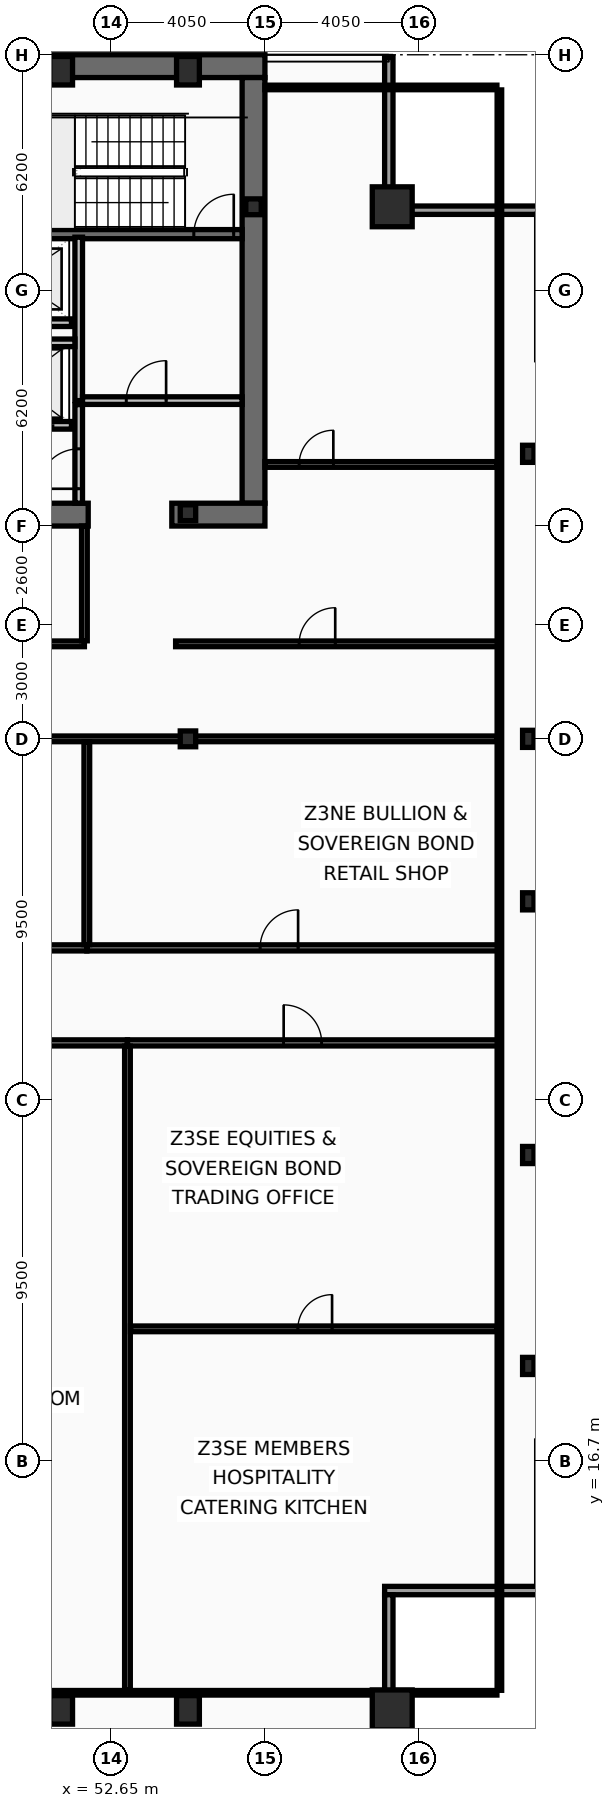
"""IFC4 building model, lengths in metres.
Left out: names, types, materials, properties, quantities, classifications, styles, units other than length and angle.
Written with IfcOpenShell. Run it as: python <this file> out.ifc"""

import sys

from ifc_helpers import new_model, si_unit, direction, frame, frame_2d, origin, origin_2d, place, context, subcontext, project, spatial, rectangle, hollow_rectangle, i_section, extrude, element, fill, save


model = new_model("IFC4")
c1 = context("Model", 3, precision=1e-05, world=origin(), true_north=direction((0.0, 1.0)))
c2 = subcontext(c1, "Body", "Model", "MODEL_VIEW")
j1 = project(units=[si_unit("LENGTHUNIT", "METRE"), si_unit("PLANEANGLEUNIT", "RADIAN")], contexts=[c1])
p1 = place(None, origin())
s1 = spatial("IfcSite", under=j1, at=p1, CompositionType="ELEMENT")
p2 = place(p1, origin())
s2 = spatial("IfcBuilding", under=s1, at=p2, CompositionType="ELEMENT")
p3 = place(p2, frame((0.0, 0.0, 246.2)))
s3 = spatial("IfcBuildingStorey", under=s2, at=p3, CompositionType="ELEMENT", Elevation=246.2)
p4 = place(p3, frame((16.2, 53.4, 0.0), z_axis=(0.0, 0.0, 1.0), x_axis=(1.0, 0.0, 0.0)))
e1 = element("IfcWall", 1, at=p4, inside=s3, PredefinedType="SHEAR", context=c2, shape_type="SweptSolid", body=[
    extrude(rectangle(XDim=40.5, YDim=0.6, at=frame_2d((20.25, 0.0))), origin(), (0.0, 0.0, 1.0), 3.44),
])
p5 = place(p3, frame((56.4, 53.1, 0.0), z_axis=(0.0, 0.0, 1.0), x_axis=(0.0, -1.0, 0.0)))
e2 = element("IfcWall", 2, at=p5, inside=s3, PredefinedType="SHEAR", context=c2, shape_type="SweptSolid", body=[
    extrude(rectangle(XDim=11.2, YDim=0.6, at=frame_2d((5.6, 0.0))), origin(), (0.0, 0.0, 1.0), 3.44),
])
p6 = place(p3, frame((52.05, 41.6, 0.0), z_axis=(0.0, 0.0, 1.0), x_axis=(-1.0, 0.0, 0.0)))
e3 = element("IfcWall", 3, at=p6, inside=s3, PredefinedType="SHEAR", context=c2, shape_type="SweptSolid", body=[
    extrude(rectangle(XDim=11.3, YDim=0.6, at=frame_2d((5.65, 0.0))), origin(), (0.0, 0.0, 1.0), 3.44),
])
p7 = place(p3, frame((56.7, 41.6, 0.0), z_axis=(0.0, 0.0, 1.0), x_axis=(-1.0, 0.0, 0.0)))
e4 = element("IfcWall", 4, at=p7, inside=s3, PredefinedType="SHEAR", context=c2, shape_type="SweptSolid", body=[
    extrude(rectangle(XDim=2.45, YDim=0.6, at=frame_2d((1.225, 0.0))), origin(), (0.0, 0.0, 1.0), 3.44),
])
p8 = place(p3, frame((48.63, 48.98, 0.0), z_axis=(0.0, 0.0, 1.0), x_axis=(1.0, 0.0, 0.0)))
e5 = element("IfcWall", 5, at=p8, inside=s3, PredefinedType="SHEAR", context=c2, shape_type="SweptSolid", body=[
    extrude(rectangle(XDim=7.47, YDim=0.24, at=frame_2d((3.735, 0.0))), origin(), (0.0, 0.0, 1.0), 3.44),
])
p9 = place(p8, frame((6.2, 0.0, 0.0)))
e6 = element("IfcOpeningElement", 6, at=p9, cuts=e5, PredefinedType="OPENING", context=c2, shape_type="SweptSolid", body=[
    extrude(rectangle(XDim=1.05, YDim=2.15, at=frame_2d((0.525, 1.075))), frame((0.0, 0.13, 0.0), z_axis=(0.0, -1.0, 0.0), x_axis=(1.0, 0.0, 0.0)), (0.0, 0.0, 1.0), 0.26),
])
for number, where, z_axis, x_axis in (
    (7, (60.05, 10.15, 0.0), (0.0, 0.0, 1.0), (1.0, 0.0, 0.0)),
    (8, (60.05, 49.7, 0.0), (0.0, 0.0, 1.0), (1.0, 0.0, 0.0)),
):
    element("IfcColumn", number, at=place(p3, frame(where, z_axis=z_axis, x_axis=x_axis)), inside=s3, PredefinedType="COLUMN", context=c2, shape_type="SweptSolid", body=[
        extrude(hollow_rectangle(XDim=1.05, YDim=1.05, WallThickness=0.055, at=origin_2d()), origin(), (0.0, 0.0, 1.0), 3.6),
    ])
for number, where, z_axis, x_axis in (
    (9, (51.337, 10.15, 0.0), (0.0, 0.0, 1.0), (1.0, 0.0, 0.0)),
    (10, (54.675, 10.15, 0.0), (0.0, 0.0, 1.0), (1.0, 0.0, 0.0)),
    (11, (51.337, 53.28, 0.0), (0.0, 0.0, 1.0), (1.0, 0.0, 0.0)),
    (12, (54.675, 53.28, 0.0), (0.0, 0.0, 1.0), (1.0, 0.0, 0.0)),
):
    element("IfcColumn", number, at=place(p3, frame(where, z_axis=z_axis, x_axis=x_axis)), inside=s3, PredefinedType="COLUMN", context=c2, shape_type="SweptSolid", body=[
        extrude(hollow_rectangle(XDim=0.6, YDim=0.75, WallThickness=0.045, at=origin_2d()), origin(), (0.0, 0.0, 1.0), 3.6),
    ])
for number, where, z_axis, x_axis in (
    (13, (63.63, 19.2, 0.0), (0.0, 0.0, 1.0), (1.0, 0.0, 0.0)),
    (14, (63.63, 24.75, 0.0), (0.0, 0.0, 1.0), (1.0, 0.0, 0.0)),
    (15, (63.63, 31.425, 0.0), (0.0, 0.0, 1.0), (1.0, 0.0, 0.0)),
    (16, (63.63, 35.7, 0.0), (0.0, 0.0, 1.0), (1.0, 0.0, 0.0)),
    (17, (63.63, 43.2, 0.0), (0.0, 0.0, 1.0), (1.0, 0.0, 0.0)),
):
    element("IfcColumn", number, at=place(p3, frame(where, z_axis=z_axis, x_axis=x_axis)), inside=s3, PredefinedType="COLUMN", context=c2, shape_type="SweptSolid", body=[
        extrude(i_section(OverallWidth=0.3, OverallDepth=0.45, WebThickness=0.014, FlangeThickness=0.026, at=origin_2d()), origin(), (0.0, 0.0, 1.0), 3.6),
    ])
for number, where, z_axis, x_axis in (
    (18, (56.4, 49.7, 0.0), (0.0, 0.0, 1.0), (1.0, 0.0, 0.0)),
    (19, (54.675, 35.7, 0.0), (0.0, 0.0, 1.0), (1.0, 0.0, 0.0)),
    (20, (54.675, 41.65, 0.0), (0.0, 0.0, 1.0), (1.0, 0.0, 0.0)),
):
    element("IfcColumn", number, at=place(p3, frame(where, z_axis=z_axis, x_axis=x_axis)), inside=s3, PredefinedType="COLUMN", context=c2, shape_type="SweptSolid", body=[
        extrude(i_section(OverallWidth=0.406, OverallDepth=0.416, WebThickness=0.03, FlangeThickness=0.048, at=origin_2d()), origin(), (0.0, 0.0, 1.0), 3.6),
    ])
p10 = place(p3, frame((59.96, 53.63, 0.0), z_axis=(0.0, 0.0, 1.0), x_axis=(0.0, -1.0, 0.0)))
e21 = element("IfcWall", 21, at=p10, inside=s3, PredefinedType="SOLIDWALL", context=c2, shape_type="SweptSolid", body=[
    extrude(rectangle(XDim=3.91, YDim=0.22, at=frame_2d((1.955, 0.0))), origin(), (0.0, 0.0, 1.0), 2.83),
])
for number, where, z_axis, x_axis in (
    (22, (59.85, 49.61, 0.0), (0.0, 0.0, 1.0), (1.0, 0.0, 0.0)),
    (23, (64.07, 13.29, 0.0), (0.0, 0.0, 1.0), (-1.0, 0.0, 0.0)),
):
    element("IfcWall", number, at=place(p3, frame(where, z_axis=z_axis, x_axis=x_axis)), inside=s3, PredefinedType="SOLIDWALL", context=c2, shape_type="SweptSolid", body=[
        extrude(rectangle(XDim=4.22, YDim=0.22, at=frame_2d((2.11, 0.0))), origin(), (0.0, 0.0, 1.0), 2.83),
    ])
p11 = place(p3, frame((59.96, 13.18, 0.0), z_axis=(0.0, 0.0, 1.0), x_axis=(0.0, -1.0, 0.0)))
e24 = element("IfcWall", 24, at=p11, inside=s3, PredefinedType="SOLIDWALL", context=c2, shape_type="SweptSolid", body=[
    extrude(rectangle(XDim=3.91, YDim=0.22, at=frame_2d((1.955, 0.0))), origin(), (0.0, 0.0, 1.0), 2.83),
])
p12 = place(p3, frame((51.61, 43.95, 0.0), z_axis=(0.0, 0.0, 1.0), x_axis=(-1.0, 0.0, 0.0)))
e25 = element("IfcWall", 25, at=p12, inside=s3, PredefinedType="PARTITIONING", context=c2, shape_type="SweptSolid", body=[
    extrude(rectangle(XDim=2.92, YDim=0.2, at=frame_2d((1.46, 0.0))), origin(), (0.0, 0.0, 1.0), 3.44),
])
p13 = place(p12, frame((0.81, 0.0, 0.0)))
e26 = element("IfcOpeningElement", 26, at=p13, cuts=e25, PredefinedType="OPENING", context=c2, shape_type="SweptSolid", body=[
    extrude(rectangle(XDim=1.3, YDim=2.18, at=frame_2d((0.65, 1.09))), frame((0.0, 0.11, 0.0), z_axis=(0.0, -1.0, 0.0), x_axis=(1.0, 0.0, 0.0)), (0.0, 0.0, 1.0), 0.22),
])
p14 = place(p3, frame((51.61, 46.65, 0.0), z_axis=(0.0, 0.0, 1.0), x_axis=(-1.0, 0.0, 0.0)))
e27 = element("IfcWall", 27, at=p14, inside=s3, PredefinedType="PARTITIONING", context=c2, shape_type="SweptSolid", body=[
    extrude(rectangle(XDim=2.92, YDim=0.2, at=frame_2d((1.46, 0.0))), origin(), (0.0, 0.0, 1.0), 3.44),
])
p15 = place(p14, frame((0.86, 0.0, 0.0)))
e28 = element("IfcOpeningElement", 28, at=p15, cuts=e27, PredefinedType="OPENING", context=c2, shape_type="SweptSolid", body=[
    extrude(rectangle(XDim=1.2, YDim=2.18, at=frame_2d((0.6, 1.09))), frame((0.0, 0.11, 0.0), z_axis=(0.0, -1.0, 0.0), x_axis=(1.0, 0.0, 0.0)), (0.0, 0.0, 1.0), 0.22),
])
p16 = place(p3, frame((51.8, 44.6, 0.0), z_axis=(0.0, 0.0, 1.0), x_axis=(0.0, 1.0, 0.0)))
e29 = element("IfcWall", 29, at=p16, inside=s3, PredefinedType="PARTITIONING", context=c2, shape_type="SweptSolid", body=[
    extrude(rectangle(XDim=4.3, YDim=0.2, at=frame_2d((2.15, 0.0))), origin(), (0.0, 0.0, 1.0), 3.44),
])
p17 = place(p3, frame((51.9, 44.6, 0.0), z_axis=(0.0, 0.0, 1.0), x_axis=(1.0, 0.0, 0.0)))
e30 = element("IfcWall", 30, at=p17, inside=s3, PredefinedType="PARTITIONING", context=c2, shape_type="SweptSolid", body=[
    extrude(rectangle(XDim=4.2, YDim=0.2, at=frame_2d((2.1, 0.0))), origin(), (0.0, 0.0, 1.0), 3.44),
])
p18 = place(p17, frame((1.15, 0.0, 0.0)))
e31 = element("IfcOpeningElement", 31, at=p18, cuts=e30, PredefinedType="OPENING", context=c2, shape_type="SweptSolid", body=[
    extrude(rectangle(XDim=1.05, YDim=2.15, at=frame_2d((0.525, 1.075))), frame((0.0, 0.11, 0.0), z_axis=(0.0, -1.0, 0.0), x_axis=(1.0, 0.0, 0.0)), (0.0, 0.0, 1.0), 0.22),
])
p19 = place(p3, frame((48.63, 46.12, 0.0), z_axis=(0.0, 0.0, 1.0), x_axis=(1.0, 0.0, 0.0)))
e32 = element("IfcWall", 32, at=p19, inside=s3, PredefinedType="PARTITIONING", context=c2, shape_type="SweptSolid", body=[
    extrude(rectangle(XDim=3.07, YDim=0.2, at=frame_2d((1.535, 0.0))), origin(), (0.0, 0.0, 1.0), 3.44),
])
p20 = place(p3, frame((51.8, 41.9, 0.0), z_axis=(0.0, 0.0, 1.0), x_axis=(0.0, 1.0, 0.0)))
e33 = element("IfcWall", 33, at=p20, inside=s3, PredefinedType="PARTITIONING", context=c2, shape_type="SweptSolid", body=[
    extrude(rectangle(XDim=2.595, YDim=0.2, at=frame_2d((1.298, 0.0))), origin(), (0.0, 0.0, 1.0), 3.44),
])
p21 = place(p20, frame((0.38, 0.0, 0.0)))
e34 = element("IfcOpeningElement", 34, at=p21, cuts=e33, PredefinedType="OPENING", context=c2, shape_type="SweptSolid", body=[
    extrude(rectangle(XDim=1.05, YDim=2.15, at=frame_2d((0.525, 1.075))), frame((0.0, 0.11, 0.0), z_axis=(0.0, -1.0, 0.0), x_axis=(1.0, 0.0, 0.0)), (0.0, 0.0, 1.0), 0.22),
])
p22 = place(p3, frame((46.3, 38.2, 0.0), z_axis=(0.0, 0.0, 1.0), x_axis=(1.0, 0.0, 0.0)))
e35 = element("IfcWall", 35, at=p22, inside=s3, PredefinedType="PARTITIONING", context=c2, shape_type="SweptSolid", body=[
    extrude(rectangle(XDim=5.65, YDim=0.15, at=frame_2d((2.825, 0.0))), origin(), (0.0, 0.0, 1.0), 2.78),
])
p23 = place(p22, frame((1.1, 0.0, 0.0)))
e36 = element("IfcOpeningElement", 36, at=p23, cuts=e35, PredefinedType="OPENING", context=c2, shape_type="SweptSolid", body=[
    extrude(rectangle(XDim=1.0, YDim=2.05, at=frame_2d((0.5, 1.025))), frame((0.0, 0.085, 0.0), z_axis=(0.0, -1.0, 0.0), x_axis=(1.0, 0.0, 0.0)), (0.0, 0.0, 1.0), 0.17),
])
p24 = place(p3, frame((51.95, 38.28, 0.0), z_axis=(0.0, 0.0, 1.0), x_axis=(0.0, 1.0, 0.0)))
e37 = element("IfcWall", 37, at=p24, inside=s3, PredefinedType="PARTITIONING", context=c2, shape_type="SweptSolid", body=[
    extrude(rectangle(XDim=3.02, YDim=0.15, at=frame_2d((1.51, 0.0))), origin(), (0.0, 0.0, 1.0), 3.44),
])
p25 = place(p3, frame((54.35, 38.2, 0.0), z_axis=(0.0, 0.0, 1.0), x_axis=(1.0, 0.0, 0.0)))
e38 = element("IfcWall", 38, at=p25, inside=s3, PredefinedType="PARTITIONING", context=c2, shape_type="SweptSolid", body=[
    extrude(rectangle(XDim=8.52, YDim=0.15, at=frame_2d((4.26, 0.0))), origin(), (0.0, 0.0, 1.0), 2.78),
])
p26 = place(p25, frame((3.25, 0.0, 0.0)))
e39 = element("IfcOpeningElement", 39, at=p26, cuts=e38, PredefinedType="OPENING", context=c2, shape_type="SweptSolid", body=[
    extrude(rectangle(XDim=0.95, YDim=2.05, at=frame_2d((0.475, 1.025))), frame((0.0, 0.085, 0.0), z_axis=(0.0, -1.0, 0.0), x_axis=(1.0, 0.0, 0.0)), (0.0, 0.0, 1.0), 0.17),
])
p27 = place(p3, frame((56.7, 42.92, 0.0), z_axis=(0.0, 0.0, 1.0), x_axis=(1.0, 0.0, 0.0)))
e40 = element("IfcWall", 40, at=p27, inside=s3, PredefinedType="PARTITIONING", context=c2, shape_type="SweptSolid", body=[
    extrude(rectangle(XDim=6.105, YDim=0.15, at=frame_2d((3.052, 0.0))), origin(), (0.0, 0.0, 1.0), 2.78),
])
p28 = place(p27, frame((0.9, 0.0, 0.0)))
e41 = element("IfcOpeningElement", 41, at=p28, cuts=e40, PredefinedType="OPENING", context=c2, shape_type="SweptSolid", body=[
    extrude(rectangle(XDim=0.9, YDim=2.05, at=frame_2d((0.45, 1.025))), frame((0.0, 0.085, 0.0), z_axis=(0.0, -1.0, 0.0), x_axis=(1.0, 0.0, 0.0)), (0.0, 0.0, 1.0), 0.17),
])
p29 = place(p3, frame((39.88, 35.7, 0.0), z_axis=(0.0, 0.0, 1.0), x_axis=(1.0, 0.0, 0.0)))
e42 = element("IfcWall", 42, at=p29, inside=s3, PredefinedType="PARTITIONING", context=c2, shape_type="SweptSolid", body=[
    extrude(rectangle(XDim=22.925, YDim=0.15, at=frame_2d((11.462, 0.0))), origin(), (0.0, 0.0, 1.0), 2.78),
])
p30 = place(p3, frame((45.393, 27.7, 0.0), z_axis=(0.0, 0.0, 1.0), x_axis=(1.0, 0.0, 0.0)))
e43 = element("IfcWall", 43, at=p30, inside=s3, PredefinedType="PARTITIONING", context=c2, shape_type="SweptSolid", body=[
    extrude(rectangle(XDim=7.69, YDim=0.16, at=frame_2d((3.845, 0.0))), origin(), (0.0, 0.0, 1.0), 2.78),
])
p31 = place(p30, frame((3.23, 0.0, 0.0)))
e44 = element("IfcOpeningElement", 44, at=p31, cuts=e43, PredefinedType="OPENING", context=c2, shape_type="SweptSolid", body=[
    extrude(rectangle(XDim=1.0, YDim=2.05, at=frame_2d((0.5, 1.025))), frame((0.0, 0.09, 0.0), z_axis=(0.0, -1.0, 0.0), x_axis=(1.0, 0.0, 0.0)), (0.0, 0.0, 1.0), 0.18),
])
p32 = place(p3, frame((53.083, 27.7, 0.0), z_axis=(0.0, 0.0, 1.0), x_axis=(1.0, 0.0, 0.0)))
e45 = element("IfcWall", 45, at=p32, inside=s3, PredefinedType="PARTITIONING", context=c2, shape_type="SweptSolid", body=[
    extrude(rectangle(XDim=9.787, YDim=0.16, at=frame_2d((4.894, 0.0))), origin(), (0.0, 0.0, 1.0), 2.78),
])
p33 = place(p32, frame((4.111, 0.0, 0.0)))
e46 = element("IfcOpeningElement", 46, at=p33, cuts=e45, PredefinedType="OPENING", context=c2, shape_type="SweptSolid", body=[
    extrude(rectangle(XDim=1.0, YDim=2.05, at=frame_2d((0.5, 1.025))), frame((0.0, 0.09, 0.0), z_axis=(0.0, -1.0, 0.0), x_axis=(1.0, 0.0, 0.0)), (0.0, 0.0, 1.0), 0.18),
])
p34 = place(p3, frame((53.083, 10.665, 0.0), z_axis=(0.0, 0.0, 1.0), x_axis=(0.0, 1.0, 0.0)))
e47 = element("IfcWall", 47, at=p34, inside=s3, PredefinedType="PARTITIONING", context=c2, shape_type="SweptSolid", body=[
    extrude(rectangle(XDim=16.95, YDim=0.15, at=frame_2d((8.475, 0.0))), origin(), (0.0, 0.0, 1.0), 2.98),
])
p35 = place(p3, frame((53.163, 20.176, 0.0), z_axis=(0.0, 0.0, 1.0), x_axis=(1.0, 0.0, 0.0)))
e48 = element("IfcWall", 48, at=p35, inside=s3, PredefinedType="PARTITIONING", context=c2, shape_type="SweptSolid", body=[
    extrude(rectangle(XDim=9.642, YDim=0.15, at=frame_2d((4.821, 0.0))), origin(), (0.0, 0.0, 1.0), 2.78),
])
p36 = place(p35, frame((4.404, 0.0, 0.0)))
e49 = element("IfcOpeningElement", 49, at=p36, cuts=e48, PredefinedType="OPENING", context=c2, shape_type="SweptSolid", body=[
    extrude(rectangle(XDim=0.9, YDim=2.05, at=frame_2d((0.45, 1.025))), frame((0.0, 0.085, 0.0), z_axis=(0.0, -1.0, 0.0), x_axis=(1.0, 0.0, 0.0)), (0.0, 0.0, 1.0), 0.17),
])
p37 = place(p3, frame((39.8, 30.2, 0.0), z_axis=(0.0, 0.0, 1.0), x_axis=(1.0, 0.0, 0.0)))
e50 = element("IfcWall", 50, at=p37, inside=s3, PredefinedType="PARTITIONING", context=c2, shape_type="SweptSolid", body=[
    extrude(rectangle(XDim=12.213, YDim=0.16, at=frame_2d((6.107, 0.0))), origin(), (0.0, 0.0, 1.0), 2.78),
])
p38 = place(p37, frame((5.13, 0.0, 0.0)))
e51 = element("IfcOpeningElement", 51, at=p38, cuts=e50, PredefinedType="OPENING", context=c2, shape_type="SweptSolid", body=[
    extrude(rectangle(XDim=1.0, YDim=2.05, at=frame_2d((0.5, 1.025))), frame((0.0, 0.09, 0.0), z_axis=(0.0, -1.0, 0.0), x_axis=(1.0, 0.0, 0.0)), (0.0, 0.0, 1.0), 0.18),
])
p39 = place(p3, frame((52.013, 30.2, 0.0), z_axis=(0.0, 0.0, 1.0), x_axis=(1.0, 0.0, 0.0)))
e52 = element("IfcWall", 52, at=p39, inside=s3, PredefinedType="PARTITIONING", context=c2, shape_type="SweptSolid", body=[
    extrude(rectangle(XDim=10.857, YDim=0.16, at=frame_2d((5.428, 0.0))), origin(), (0.0, 0.0, 1.0), 2.78),
])
p40 = place(p39, frame((4.56, 0.0, 0.0)))
e53 = element("IfcOpeningElement", 53, at=p40, cuts=e52, PredefinedType="OPENING", context=c2, shape_type="SweptSolid", body=[
    extrude(rectangle(XDim=1.0, YDim=2.05, at=frame_2d((0.5, 1.025))), frame((0.0, 0.09, 0.0), z_axis=(0.0, -1.0, 0.0), x_axis=(1.0, 0.0, 0.0)), (0.0, 0.0, 1.0), 0.18),
])
p41 = place(p3, frame((52.013, 30.285, 0.0), z_axis=(0.0, 0.0, 1.0), x_axis=(0.0, 1.0, 0.0)))
e54 = element("IfcWall", 54, at=p41, inside=s3, PredefinedType="PARTITIONING", context=c2, shape_type="SweptSolid", body=[
    extrude(rectangle(XDim=5.335, YDim=0.15, at=frame_2d((2.667, 0.0))), origin(), (0.0, 0.0, 1.0), 2.98),
])
p42 = place(p3, frame((62.87, 10.665, 0.0), z_axis=(0.0, 0.0, 1.0), x_axis=(0.0, 1.0, 0.0)))
e55 = element("IfcWall", 55, at=p42, inside=s3, PredefinedType="PARTITIONING", context=c2, shape_type="SweptSolid", body=[
    extrude(rectangle(XDim=42.11, YDim=0.12, at=frame_2d((21.055, 0.0))), origin(), (0.0, 0.0, 1.0), 2.78),
])
p43 = place(p3, frame((56.7, 52.84, 0.0), z_axis=(0.0, 0.0, 1.0), x_axis=(1.0, 0.0, 0.0)))
e56 = element("IfcWall", 56, at=p43, inside=s3, PredefinedType="PARTITIONING", context=c2, shape_type="SweptSolid", body=[
    extrude(rectangle(XDim=6.105, YDim=0.12, at=frame_2d((3.052, 0.0))), origin(), (0.0, 0.0, 1.0), 3.44),
])
p44 = place(p3, frame((10.095, 10.6, 0.0), z_axis=(0.0, 0.0, 1.0), x_axis=(1.0, 0.0, 0.0)))
e57 = element("IfcWall", 57, at=p44, inside=s3, PredefinedType="PARTITIONING", context=c2, shape_type="SweptSolid", body=[
    extrude(rectangle(XDim=52.71, YDim=0.12, at=frame_2d((26.355, 0.0))), origin(), (0.0, 0.0, 1.0), 2.78),
])
p45 = place(p9, origin())
e58 = element("IfcDoor", 58, at=p45, inside=s3, OperationType="SINGLE_SWING_RIGHT", PredefinedType="DOOR", context=c2, shape_type="SweptSolid", body=[
    extrude(rectangle(XDim=1.05, YDim=2.15, at=frame_2d((0.525, 1.075))), frame((0.0, 0.025, 0.0), z_axis=(0.0, -1.0, 0.0), x_axis=(1.0, 0.0, 0.0)), (0.0, 0.0, 1.0), 0.05),
])
fill(e6, e58)
p46 = place(p18, origin())
e59 = element("IfcDoor", 59, at=p46, inside=s3, OperationType="SINGLE_SWING_RIGHT", PredefinedType="DOOR", context=c2, shape_type="SweptSolid", body=[
    extrude(rectangle(XDim=1.05, YDim=2.15, at=frame_2d((0.525, 1.075))), frame((0.0, 0.025, 0.0), z_axis=(0.0, -1.0, 0.0), x_axis=(1.0, 0.0, 0.0)), (0.0, 0.0, 1.0), 0.05),
])
fill(e31, e59)
p47 = place(p21, origin())
e60 = element("IfcDoor", 60, at=p47, inside=s3, OperationType="SINGLE_SWING_LEFT", PredefinedType="DOOR", context=c2, shape_type="SweptSolid", body=[
    extrude(rectangle(XDim=1.05, YDim=2.15, at=frame_2d((0.525, 1.075))), frame((0.0, 0.025, 0.0), z_axis=(0.0, -1.0, 0.0), x_axis=(1.0, 0.0, 0.0)), (0.0, 0.0, 1.0), 0.05),
])
fill(e34, e60)
p48 = place(p26, origin())
e61 = element("IfcDoor", 61, at=p48, inside=s3, OperationType="SINGLE_SWING_RIGHT", PredefinedType="DOOR", context=c2, shape_type="SweptSolid", body=[
    extrude(rectangle(XDim=0.95, YDim=2.05, at=frame_2d((0.475, 1.025))), frame((0.0, 0.025, 0.0), z_axis=(0.0, -1.0, 0.0), x_axis=(1.0, 0.0, 0.0)), (0.0, 0.0, 1.0), 0.05),
])
fill(e39, e61)
p49 = place(p28, origin())
e62 = element("IfcDoor", 62, at=p49, inside=s3, OperationType="SINGLE_SWING_RIGHT", PredefinedType="DOOR", context=c2, shape_type="SweptSolid", body=[
    extrude(rectangle(XDim=0.9, YDim=2.05, at=frame_2d((0.45, 1.025))), frame((0.0, 0.025, 0.0), z_axis=(0.0, -1.0, 0.0), x_axis=(1.0, 0.0, 0.0)), (0.0, 0.0, 1.0), 0.05),
])
fill(e41, e62)
p50 = place(p33, origin())
e63 = element("IfcDoor", 63, at=p50, inside=s3, OperationType="SINGLE_SWING_LEFT", PredefinedType="DOOR", context=c2, shape_type="SweptSolid", body=[
    extrude(rectangle(XDim=1.0, YDim=2.05, at=frame_2d((0.5, 1.025))), frame((0.0, 0.025, 0.0), z_axis=(0.0, -1.0, 0.0), x_axis=(1.0, 0.0, 0.0)), (0.0, 0.0, 1.0), 0.05),
])
fill(e46, e63)
p51 = place(p36, origin())
e64 = element("IfcDoor", 64, at=p51, inside=s3, OperationType="SINGLE_SWING_RIGHT", PredefinedType="DOOR", context=c2, shape_type="SweptSolid", body=[
    extrude(rectangle(XDim=0.9, YDim=2.05, at=frame_2d((0.45, 1.025))), frame((0.0, 0.025, 0.0), z_axis=(0.0, -1.0, 0.0), x_axis=(1.0, 0.0, 0.0)), (0.0, 0.0, 1.0), 0.05),
])
fill(e49, e64)
p52 = place(p40, origin())
e65 = element("IfcDoor", 65, at=p52, inside=s3, OperationType="SINGLE_SWING_RIGHT", PredefinedType="DOOR", context=c2, shape_type="SweptSolid", body=[
    extrude(rectangle(XDim=1.0, YDim=2.05, at=frame_2d((0.5, 1.025))), frame((0.0, 0.025, 0.0), z_axis=(0.0, -1.0, 0.0), x_axis=(1.0, 0.0, 0.0)), (0.0, 0.0, 1.0), 0.05),
])
fill(e53, e65)
save(model, sys.argv[1])
